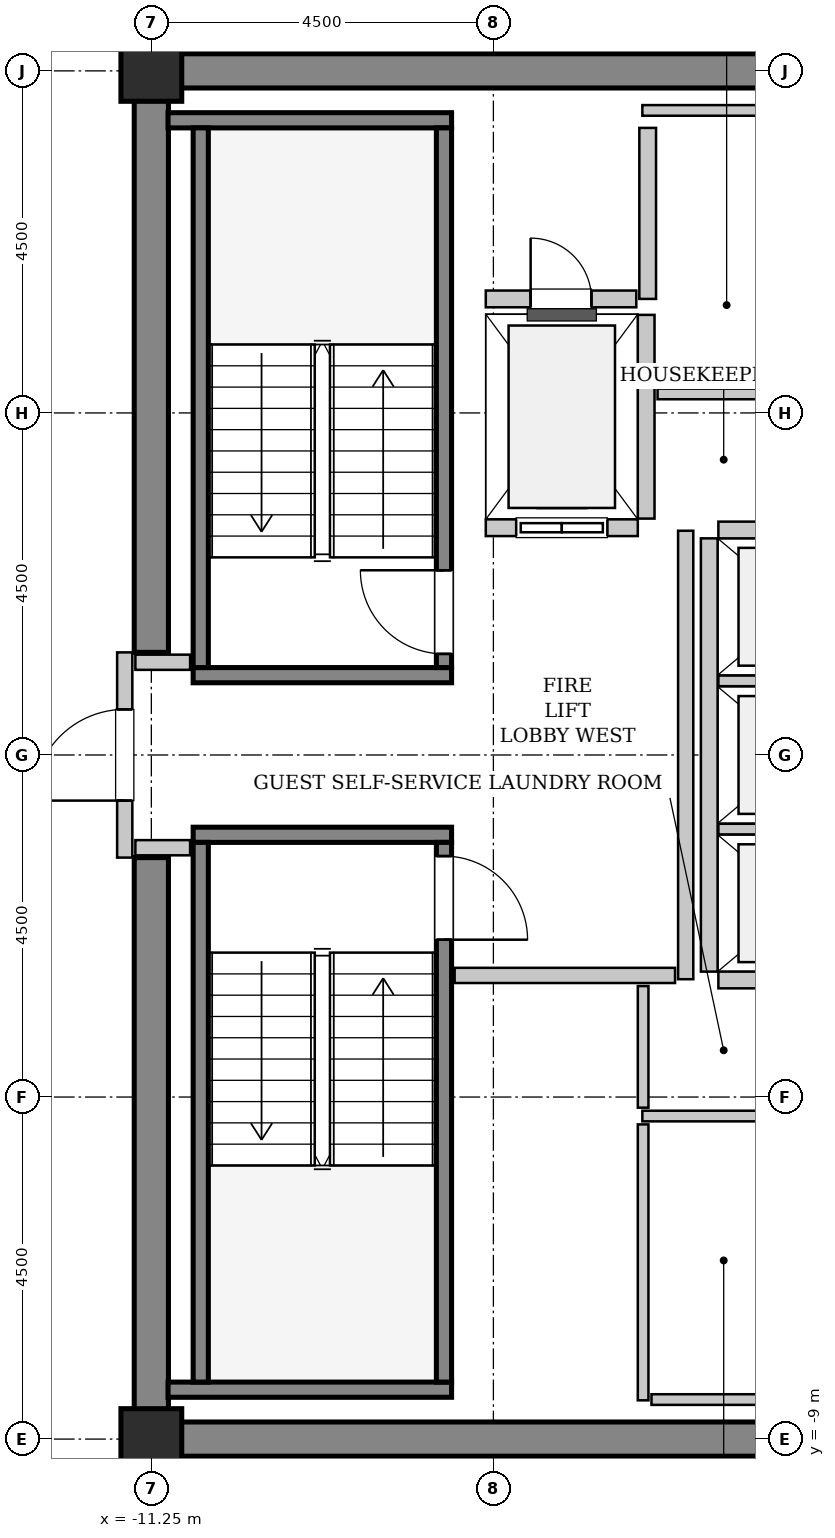
"""IFC4 building model, lengths in metres.
Left out: names, types, materials, properties, quantities, classifications, styles, units other than length and angle.
Written with IfcOpenShell. Run it as: python <this file> out.ifc"""

import sys

from ifc_helpers import new_model, si_unit, direction, frame, frame_2d, origin, origin_2d, place, context, subcontext, project, spatial, rectangle, hollow_rectangle, extrude, source, transform, mapped, element, fill, save


model = new_model("IFC4")
c1 = context("Model", 3, precision=1e-05, world=origin(), true_north=direction((0.0, 1.0)))
c2 = subcontext(c1, "Body", "Model", "MODEL_VIEW")
j1 = project(units=[si_unit("LENGTHUNIT", "METRE"), si_unit("PLANEANGLEUNIT", "RADIAN")], contexts=[c1])
p1 = place(None, origin())
s1 = spatial("IfcSite", under=j1, at=p1, CompositionType="ELEMENT")
p2 = place(p1, origin())
s2 = spatial("IfcBuilding", under=s1, at=p2, CompositionType="ELEMENT")
p3 = place(p2, frame((0.0, 0.0, 279.8)))
s3 = spatial("IfcBuildingStorey", under=s2, at=p3, CompositionType="ELEMENT", Elevation=279.8)
m1 = source(origin(), c2, "Body", "SweptSolid", [
    extrude(rectangle(XDim=9.925, YDim=0.45, at=frame_2d((4.962, 0.0))), origin(), (0.0, 0.0, 1.0), 3.8),
])
for number, where, z_axis, x_axis in (
    (1, (-11.475, 9.0, 0.0), (0.0, 0.0, 1.0), (1.0, 0.0, 0.0)),
    (2, (-11.475, -9.0, 0.0), (0.0, 0.0, 1.0), (1.0, 0.0, 0.0)),
):
    element("IfcWall", number, at=place(p3, frame(where, z_axis=z_axis, x_axis=x_axis)), inside=s3, PredefinedType="SHEAR", context=c2, shape_type="MappedRepresentation", body=[
        mapped(m1, transform((0.0, 0.0, 0.0), x_axis=(1.0, 0.0, 0.0), y_axis=(0.0, 1.0, 0.0), z_axis=(0.0, 0.0, 1.0), scale=1.0)),
    ])
m2 = source(origin(), c2, "Body", "SweptSolid", [
    extrude(rectangle(XDim=7.425, YDim=0.45, at=frame_2d((3.712, 0.0))), origin(), (0.0, 0.0, 1.0), 3.8),
])
for number, where, z_axis, x_axis in (
    (3, (-11.25, -8.775, 0.0), (0.0, 0.0, 1.0), (0.0, 1.0, 0.0)),
    (4, (-11.25, 1.35, 0.0), (0.0, 0.0, 1.0), (0.0, 1.0, 0.0)),
):
    element("IfcWall", number, at=place(p3, frame(where, z_axis=z_axis, x_axis=x_axis)), inside=s3, PredefinedType="SHEAR", context=c2, shape_type="MappedRepresentation", body=[
        mapped(m2, transform((0.0, 0.0, 0.0), x_axis=(1.0, 0.0, 0.0), y_axis=(0.0, 1.0, 0.0), z_axis=(0.0, 0.0, 1.0), scale=1.0)),
    ])
m3 = source(origin(), c2, "Body", "SweptSolid", [
    extrude(hollow_rectangle(XDim=0.8, YDim=0.8, WallThickness=0.04, InnerFilletRadius=0.04, OuterFilletRadius=0.08, at=origin_2d()), origin(), (0.0, 0.0, 1.0), 3.8),
])
for number, where, z_axis, x_axis in (
    (5, (-11.25, -9.0, 0.0), (0.0, 0.0, 1.0), (1.0, 0.0, 0.0)),
    (6, (-11.25, 9.0, 0.0), (0.0, 0.0, 1.0), (1.0, 0.0, 0.0)),
):
    element("IfcColumn", number, at=place(p3, frame(where, z_axis=z_axis, x_axis=x_axis)), inside=s3, PredefinedType="COLUMN", context=c2, shape_type="MappedRepresentation", body=[
        mapped(m3, transform((0.0, 0.0, 0.0), x_axis=(1.0, 0.0, 0.0), y_axis=(0.0, 1.0, 0.0), z_axis=(0.0, 0.0, 1.0), scale=1.0)),
    ])
m4 = source(origin(), c2, "Body", "SweptSolid", [
    extrude(rectangle(XDim=3.4, YDim=0.2, at=frame_2d((1.7, 0.0))), origin(), (0.0, 0.0, 1.0), 3.8),
])
p4 = place(p3, frame((-7.3, 1.05, 0.0), z_axis=(0.0, 0.0, 1.0), x_axis=(-1.0, 0.0, 0.0)))
e7 = element("IfcWall", 7, at=p4, inside=s3, PredefinedType="SOLIDWALL", context=c2, shape_type="MappedRepresentation", body=[
    mapped(m4, transform((0.0, 0.0, 0.0), x_axis=(1.0, 0.0, 0.0), y_axis=(0.0, 1.0, 0.0), z_axis=(0.0, 0.0, 1.0), scale=1.0)),
])
m5 = source(origin(), c2, "Body", "SweptSolid", [
    extrude(rectangle(XDim=3.73, YDim=0.2, at=frame_2d((1.865, 0.0))), origin(), (0.0, 0.0, 1.0), 3.8),
])
p5 = place(p3, frame((-7.3, 8.35, 0.0), z_axis=(0.0, 0.0, 1.0), x_axis=(-1.0, 0.0, 0.0)))
e8 = element("IfcWall", 8, at=p5, inside=s3, PredefinedType="SOLIDWALL", context=c2, shape_type="MappedRepresentation", body=[
    mapped(m5, transform((0.0, 0.0, 0.0), x_axis=(1.0, 0.0, 0.0), y_axis=(0.0, 1.0, 0.0), z_axis=(0.0, 0.0, 1.0), scale=1.0)),
])
m6 = source(origin(), c2, "Body", "SweptSolid", [
    extrude(rectangle(XDim=7.1, YDim=0.2, at=frame_2d((3.55, 0.0))), origin(), (0.0, 0.0, 1.0), 3.8),
])
p6 = place(p3, frame((-7.4, 1.15, 0.0), z_axis=(0.0, 0.0, 1.0), x_axis=(0.0, 1.0, 0.0)))
e9 = element("IfcWall", 9, at=p6, inside=s3, PredefinedType="SOLIDWALL", context=c2, shape_type="MappedRepresentation", body=[
    mapped(m6, transform((0.0, 0.0, 0.0), x_axis=(1.0, 0.0, 0.0), y_axis=(0.0, 1.0, 0.0), z_axis=(0.0, 0.0, 1.0), scale=1.0)),
])
p7 = place(p6, frame((0.18, 0.0, 0.0)))
e10 = element("IfcOpeningElement", 10, at=p7, cuts=e9, PredefinedType="OPENING", context=c2, shape_type="SweptSolid", body=[
    extrude(rectangle(XDim=1.1, YDim=2.15, at=frame_2d((0.55, 1.075))), frame((0.0, 0.11, 0.0), z_axis=(0.0, -1.0, 0.0), x_axis=(1.0, 0.0, 0.0)), (0.0, 0.0, 1.0), 0.22),
])
p8 = place(p3, frame((-10.6, 1.15, 0.0), z_axis=(0.0, 0.0, 1.0), x_axis=(0.0, 1.0, 0.0)))
e11 = element("IfcWall", 11, at=p8, inside=s3, PredefinedType="SOLIDWALL", context=c2, shape_type="MappedRepresentation", body=[
    mapped(m6, transform((0.0, 0.0, 0.0), x_axis=(1.0, 0.0, 0.0), y_axis=(0.0, 1.0, 0.0), z_axis=(0.0, 0.0, 1.0), scale=1.0)),
])
p9 = place(p3, frame((-10.7, -1.05, 0.0), z_axis=(0.0, 0.0, 1.0), x_axis=(1.0, 0.0, 0.0)))
e12 = element("IfcWall", 12, at=p9, inside=s3, PredefinedType="SOLIDWALL", context=c2, shape_type="MappedRepresentation", body=[
    mapped(m4, transform((0.0, 0.0, 0.0), x_axis=(1.0, 0.0, 0.0), y_axis=(0.0, 1.0, 0.0), z_axis=(0.0, 0.0, 1.0), scale=1.0)),
])
p10 = place(p3, frame((-11.03, -8.35, 0.0), z_axis=(0.0, 0.0, 1.0), x_axis=(1.0, 0.0, 0.0)))
e13 = element("IfcWall", 13, at=p10, inside=s3, PredefinedType="SOLIDWALL", context=c2, shape_type="MappedRepresentation", body=[
    mapped(m5, transform((0.0, 0.0, 0.0), x_axis=(1.0, 0.0, 0.0), y_axis=(0.0, 1.0, 0.0), z_axis=(0.0, 0.0, 1.0), scale=1.0)),
])
p11 = place(p3, frame((-10.6, -1.15, 0.0), z_axis=(0.0, 0.0, 1.0), x_axis=(0.0, -1.0, 0.0)))
e14 = element("IfcWall", 14, at=p11, inside=s3, PredefinedType="SOLIDWALL", context=c2, shape_type="MappedRepresentation", body=[
    mapped(m6, transform((0.0, 0.0, 0.0), x_axis=(1.0, 0.0, 0.0), y_axis=(0.0, 1.0, 0.0), z_axis=(0.0, 0.0, 1.0), scale=1.0)),
])
p12 = place(p3, frame((-7.4, -1.15, 0.0), z_axis=(0.0, 0.0, 1.0), x_axis=(0.0, -1.0, 0.0)))
e15 = element("IfcWall", 15, at=p12, inside=s3, PredefinedType="SOLIDWALL", context=c2, shape_type="MappedRepresentation", body=[
    mapped(m6, transform((0.0, 0.0, 0.0), x_axis=(1.0, 0.0, 0.0), y_axis=(0.0, 1.0, 0.0), z_axis=(0.0, 0.0, 1.0), scale=1.0)),
])
p13 = place(p12, frame((0.18, 0.0, 0.0)))
e16 = element("IfcOpeningElement", 16, at=p13, cuts=e15, PredefinedType="OPENING", context=c2, shape_type="SweptSolid", body=[
    extrude(rectangle(XDim=1.1, YDim=2.15, at=frame_2d((0.55, 1.075))), frame((0.0, 0.11, 0.0), z_axis=(0.0, -1.0, 0.0), x_axis=(1.0, 0.0, 0.0)), (0.0, 0.0, 1.0), 0.22),
])
m7 = source(origin(), c2, "Body", "SweptSolid", [
    extrude(rectangle(XDim=2.0, YDim=0.22, at=frame_2d((1.0, 0.0))), origin(), (0.0, 0.0, 1.0), 3.535),
])
p14 = place(p3, frame((-6.85, 2.99, 0.0), z_axis=(0.0, 0.0, 1.0), x_axis=(1.0, 0.0, 0.0)))
e17 = element("IfcWall", 17, at=p14, inside=s3, PredefinedType="SOLIDWALL", context=c2, shape_type="MappedRepresentation", body=[
    mapped(m7, transform((0.0, 0.0, 0.0), x_axis=(1.0, 0.0, 0.0), y_axis=(0.0, 1.0, 0.0), z_axis=(0.0, 0.0, 1.0), scale=1.0)),
])
p15 = place(p14, frame((0.4, 0.0, 0.0)))
e18 = element("IfcOpeningElement", 18, at=p15, cuts=e17, PredefinedType="OPENING", context=c2, shape_type="SweptSolid", body=[
    extrude(rectangle(XDim=1.2, YDim=2.2, at=frame_2d((0.6, 1.1))), frame((0.0, 0.12, 0.0), z_axis=(0.0, -1.0, 0.0), x_axis=(1.0, 0.0, 0.0)), (0.0, 0.0, 1.0), 0.24),
])
m8 = source(origin(), c2, "Body", "SweptSolid", [
    extrude(rectangle(XDim=2.68, YDim=0.22, at=frame_2d((1.34, 0.0))), origin(), (0.0, 0.0, 1.0), 3.535),
])
p16 = place(p3, frame((-4.74, 3.11, 0.0), z_axis=(0.0, 0.0, 1.0), x_axis=(0.0, 1.0, 0.0)))
e19 = element("IfcWall", 19, at=p16, inside=s3, PredefinedType="SOLIDWALL", context=c2, shape_type="MappedRepresentation", body=[
    mapped(m8, transform((0.0, 0.0, 0.0), x_axis=(1.0, 0.0, 0.0), y_axis=(0.0, 1.0, 0.0), z_axis=(0.0, 0.0, 1.0), scale=1.0)),
])
m9 = source(origin(), c2, "Body", "SweptSolid", [
    extrude(rectangle(XDim=5.7, YDim=0.22, at=frame_2d((2.85, 0.0))), origin(), (0.0, 0.0, 1.0), 3.535),
])
p17 = place(p3, frame((-3.91, 2.85, 0.0), z_axis=(0.0, 0.0, 1.0), x_axis=(0.0, -1.0, 0.0)))
e20 = element("IfcWall", 20, at=p17, inside=s3, PredefinedType="SOLIDWALL", context=c2, shape_type="MappedRepresentation", body=[
    mapped(m9, transform((0.0, 0.0, 0.0), x_axis=(1.0, 0.0, 0.0), y_axis=(0.0, 1.0, 0.0), z_axis=(0.0, 0.0, 1.0), scale=1.0)),
])
m10 = source(origin(), c2, "Body", "SweptSolid", [
    extrude(rectangle(XDim=2.13, YDim=0.22, at=frame_2d((1.065, 0.0))), origin(), (0.0, 0.0, 1.0), 3.535),
])
p18 = place(p3, frame((-3.79, -2.96, 0.0), z_axis=(0.0, 0.0, 1.0), x_axis=(1.0, 0.0, 0.0)))
e21 = element("IfcWall", 21, at=p18, inside=s3, PredefinedType="SOLIDWALL", context=c2, shape_type="MappedRepresentation", body=[
    mapped(m10, transform((0.0, 0.0, 0.0), x_axis=(1.0, 0.0, 0.0), y_axis=(0.0, 1.0, 0.0), z_axis=(0.0, 0.0, 1.0), scale=1.0)),
])
m11 = source(origin(), c2, "Body", "SweptSolid", [
    extrude(rectangle(XDim=2.13, YDim=0.14, at=frame_2d((1.065, 0.0))), origin(), (0.0, 0.0, 1.0), 3.535),
])
for number, where, z_axis, x_axis in (
    (22, (-3.79, -0.975, 0.0), (0.0, 0.0, 1.0), (1.0, 0.0, 0.0)),
    (23, (-3.79, 0.975, 0.0), (0.0, 0.0, 1.0), (1.0, 0.0, 0.0)),
):
    element("IfcWall", number, at=place(p3, frame(where, z_axis=z_axis, x_axis=x_axis)), inside=s3, PredefinedType="PARTITIONING", context=c2, shape_type="MappedRepresentation", body=[
        mapped(m11, transform((0.0, 0.0, 0.0), x_axis=(1.0, 0.0, 0.0), y_axis=(0.0, 1.0, 0.0), z_axis=(0.0, 0.0, 1.0), scale=1.0)),
    ])
p19 = place(p3, frame((-1.66, 2.96, 0.0), z_axis=(0.0, 0.0, 1.0), x_axis=(-1.0, 0.0, 0.0)))
e24 = element("IfcWall", 24, at=p19, inside=s3, PredefinedType="SOLIDWALL", context=c2, shape_type="MappedRepresentation", body=[
    mapped(m10, transform((0.0, 0.0, 0.0), x_axis=(1.0, 0.0, 0.0), y_axis=(0.0, 1.0, 0.0), z_axis=(0.0, 0.0, 1.0), scale=1.0)),
])
m12 = source(origin(), c2, "Body", "SweptSolid", [
    extrude(rectangle(XDim=2.25, YDim=0.22, at=frame_2d((1.125, 0.0))), origin(), (0.0, 0.0, 1.0), 3.535),
])
p20 = place(p3, frame((-4.72, 6.0, 0.0), z_axis=(0.0, 0.0, 1.0), x_axis=(0.0, 1.0, 0.0)))
e25 = element("IfcWall", 25, at=p20, inside=s3, PredefinedType="SOLIDWALL", context=c2, shape_type="MappedRepresentation", body=[
    mapped(m12, transform((0.0, 0.0, 0.0), x_axis=(1.0, 0.0, 0.0), y_axis=(0.0, 1.0, 0.0), z_axis=(0.0, 0.0, 1.0), scale=1.0)),
])
m13 = source(origin(), c2, "Body", "SweptSolid", [
    extrude(rectangle(XDim=1.98, YDim=0.22, at=frame_2d((0.99, 0.0))), origin(), (0.0, 0.0, 1.0), 3.535),
])
p21 = place(p3, frame((-6.85, 6.0, 0.0), z_axis=(0.0, 0.0, 1.0), x_axis=(1.0, 0.0, 0.0)))
e26 = element("IfcWall", 26, at=p21, inside=s3, PredefinedType="SOLIDWALL", context=c2, shape_type="MappedRepresentation", body=[
    mapped(m13, transform((0.0, 0.0, 0.0), x_axis=(1.0, 0.0, 0.0), y_axis=(0.0, 1.0, 0.0), z_axis=(0.0, 0.0, 1.0), scale=1.0)),
])
p22 = place(p21, frame((0.59, 0.0, 0.0)))
e27 = element("IfcOpeningElement", 27, at=p22, cuts=e26, PredefinedType="OPENING", context=c2, shape_type="SweptSolid", body=[
    extrude(rectangle(XDim=0.8, YDim=2.0, at=frame_2d((0.4, 1.0))), frame((0.0, 0.12, 0.0), z_axis=(0.0, -1.0, 0.0), x_axis=(1.0, 0.0, 0.0)), (0.0, 0.0, 1.0), 0.24),
])
m14 = source(origin(), c2, "Body", "SweptSolid", [
    extrude(rectangle(XDim=2.7, YDim=0.2, at=frame_2d((1.35, 0.0))), origin(), (0.0, 0.0, 1.0), 2.625),
])
p23 = place(p3, frame((-11.6, -1.35, 0.0), z_axis=(0.0, 0.0, 1.0), x_axis=(0.0, 1.0, 0.0)))
e28 = element("IfcWall", 28, at=p23, inside=s3, PredefinedType="PARTITIONING", context=c2, shape_type="MappedRepresentation", body=[
    mapped(m14, transform((0.0, 0.0, 0.0), x_axis=(1.0, 0.0, 0.0), y_axis=(0.0, 1.0, 0.0), z_axis=(0.0, 0.0, 1.0), scale=1.0)),
])
p24 = place(p23, frame((0.75, 0.0, 0.0)))
e29 = element("IfcOpeningElement", 29, at=p24, cuts=e28, PredefinedType="OPENING", context=c2, shape_type="SweptSolid", body=[
    extrude(rectangle(XDim=1.2, YDim=2.15, at=frame_2d((0.6, 1.075))), frame((0.0, 0.11, 0.0), z_axis=(0.0, -1.0, 0.0), x_axis=(1.0, 0.0, 0.0)), (0.0, 0.0, 1.0), 0.22),
])
m15 = source(origin(), c2, "Body", "SweptSolid", [
    extrude(rectangle(XDim=5.9, YDim=0.2, at=frame_2d((2.95, 0.0))), origin(), (0.0, 0.0, 1.0), 3.535),
])
p25 = place(p3, frame((-4.22, -2.95, 0.0), z_axis=(0.0, 0.0, 1.0), x_axis=(0.0, 1.0, 0.0)))
e30 = element("IfcWall", 30, at=p25, inside=s3, PredefinedType="PARTITIONING", context=c2, shape_type="MappedRepresentation", body=[
    mapped(m15, transform((0.0, 0.0, 0.0), x_axis=(1.0, 0.0, 0.0), y_axis=(0.0, 1.0, 0.0), z_axis=(0.0, 0.0, 1.0), scale=1.0)),
])
m16 = source(origin(), c2, "Body", "SweptSolid", [
    extrude(rectangle(XDim=2.9, YDim=0.2, at=frame_2d((1.45, 0.0))), origin(), (0.0, 0.0, 1.0), 3.535),
])
p26 = place(p3, frame((-7.26, -2.9, 0.0), z_axis=(0.0, 0.0, 1.0), x_axis=(1.0, 0.0, 0.0)))
e31 = element("IfcWall", 31, at=p26, inside=s3, PredefinedType="PARTITIONING", context=c2, shape_type="MappedRepresentation", body=[
    mapped(m16, transform((0.0, 0.0, 0.0), x_axis=(1.0, 0.0, 0.0), y_axis=(0.0, 1.0, 0.0), z_axis=(0.0, 0.0, 1.0), scale=1.0)),
])
m17 = source(origin(), c2, "Body", "SweptSolid", [
    extrude(rectangle(XDim=0.72, YDim=0.2, at=frame_2d((0.36, 0.0))), origin(), (0.0, 0.0, 1.0), 3.535),
])
for number, where, z_axis, x_axis in (
    (32, (-11.46, 1.22, 0.0), (0.0, 0.0, 1.0), (1.0, 0.0, 0.0)),
    (33, (-11.46, -1.22, 0.0), (0.0, 0.0, 1.0), (1.0, 0.0, 0.0)),
):
    element("IfcWall", number, at=place(p3, frame(where, z_axis=z_axis, x_axis=x_axis)), inside=s3, PredefinedType="PARTITIONING", context=c2, shape_type="MappedRepresentation", body=[
        mapped(m17, transform((0.0, 0.0, 0.0), x_axis=(1.0, 0.0, 0.0), y_axis=(0.0, 1.0, 0.0), z_axis=(0.0, 0.0, 1.0), scale=1.0)),
    ])
m18 = source(origin(), c2, "Body", "SweptSolid", [
    extrude(rectangle(XDim=2.95, YDim=0.14, at=frame_2d((1.475, 0.0))), origin(), (0.0, 0.0, 1.0), 3.535),
])
p27 = place(p3, frame((-4.59, 4.75, 0.0), z_axis=(0.0, 0.0, 1.0), x_axis=(1.0, 0.0, 0.0)))
e34 = element("IfcWall", 34, at=p27, inside=s3, PredefinedType="PARTITIONING", context=c2, shape_type="MappedRepresentation", body=[
    mapped(m18, transform((0.0, 0.0, 0.0), x_axis=(1.0, 0.0, 0.0), y_axis=(0.0, 1.0, 0.0), z_axis=(0.0, 0.0, 1.0), scale=1.0)),
])
m19 = source(origin(), c2, "Body", "SweptSolid", [
    extrude(rectangle(XDim=3.15, YDim=0.14, at=frame_2d((1.575, 0.0))), origin(), (0.0, 0.0, 1.0), 3.535),
])
for number, where, z_axis, x_axis in (
    (35, (-4.79, 8.48, 0.0), (0.0, 0.0, 1.0), (1.0, 0.0, 0.0)),
    (36, (-4.79, -4.75, 0.0), (0.0, 0.0, 1.0), (1.0, 0.0, 0.0)),
):
    element("IfcWall", number, at=place(p3, frame(where, z_axis=z_axis, x_axis=x_axis)), inside=s3, PredefinedType="PARTITIONING", context=c2, shape_type="MappedRepresentation", body=[
        mapped(m19, transform((0.0, 0.0, 0.0), x_axis=(1.0, 0.0, 0.0), y_axis=(0.0, 1.0, 0.0), z_axis=(0.0, 0.0, 1.0), scale=1.0)),
    ])
m20 = source(origin(), c2, "Body", "SweptSolid", [
    extrude(rectangle(XDim=1.6, YDim=0.14, at=frame_2d((0.8, 0.0))), origin(), (0.0, 0.0, 1.0), 3.535),
])
p28 = place(p3, frame((-4.78, -4.64, 0.0), z_axis=(0.0, 0.0, 1.0), x_axis=(0.0, 1.0, 0.0)))
e37 = element("IfcWall", 37, at=p28, inside=s3, PredefinedType="PARTITIONING", context=c2, shape_type="MappedRepresentation", body=[
    mapped(m20, transform((0.0, 0.0, 0.0), x_axis=(1.0, 0.0, 0.0), y_axis=(0.0, 1.0, 0.0), z_axis=(0.0, 0.0, 1.0), scale=1.0)),
])
m21 = source(origin(), c2, "Body", "SweptSolid", [
    extrude(rectangle(XDim=3.63, YDim=0.14, at=frame_2d((1.815, 0.0))), origin(), (0.0, 0.0, 1.0), 3.535),
])
p29 = place(p3, frame((-4.78, -8.49, 0.0), z_axis=(0.0, 0.0, 1.0), x_axis=(0.0, 1.0, 0.0)))
e38 = element("IfcWall", 38, at=p29, inside=s3, PredefinedType="PARTITIONING", context=c2, shape_type="MappedRepresentation", body=[
    mapped(m21, transform((0.0, 0.0, 0.0), x_axis=(1.0, 0.0, 0.0), y_axis=(0.0, 1.0, 0.0), z_axis=(0.0, 0.0, 1.0), scale=1.0)),
])
m22 = source(origin(), c2, "Body", "SweptSolid", [
    extrude(rectangle(XDim=3.03, YDim=0.14, at=frame_2d((1.515, 0.0))), origin(), (0.0, 0.0, 1.0), 3.535),
])
p30 = place(p3, frame((-4.67, -8.48, 0.0), z_axis=(0.0, 0.0, 1.0), x_axis=(1.0, 0.0, 0.0)))
e39 = element("IfcWall", 39, at=p30, inside=s3, PredefinedType="PARTITIONING", context=c2, shape_type="MappedRepresentation", body=[
    mapped(m22, transform((0.0, 0.0, 0.0), x_axis=(1.0, 0.0, 0.0), y_axis=(0.0, 1.0, 0.0), z_axis=(0.0, 0.0, 1.0), scale=1.0)),
])
m23 = source(origin(), c2, "Body", "SweptSolid", [
    extrude(rectangle(XDim=1.1, YDim=2.15, at=frame_2d((0.55, 1.075))), frame((0.0, 0.025, 0.0), z_axis=(0.0, -1.0, 0.0), x_axis=(1.0, 0.0, 0.0)), (0.0, 0.0, 1.0), 0.05),
])
p31 = place(p7, origin())
e40 = element("IfcDoor", 40, at=p31, inside=s3, OperationType="SINGLE_SWING_RIGHT", PredefinedType="DOOR", context=c2, shape_type="MappedRepresentation", body=[
    mapped(m23, transform((0.0, 0.0, 0.0), x_axis=(1.0, 0.0, 0.0), y_axis=(0.0, 1.0, 0.0), z_axis=(0.0, 0.0, 1.0), scale=1.0)),
])
fill(e10, e40)
p32 = place(p13, origin())
e41 = element("IfcDoor", 41, at=p32, inside=s3, OperationType="SINGLE_SWING_RIGHT", PredefinedType="DOOR", context=c2, shape_type="MappedRepresentation", body=[
    mapped(m23, transform((0.0, 0.0, 0.0), x_axis=(1.0, 0.0, 0.0), y_axis=(0.0, 1.0, 0.0), z_axis=(0.0, 0.0, 1.0), scale=1.0)),
])
fill(e16, e41)
m24 = source(origin(), c2, "Body", "SweptSolid", [
    extrude(rectangle(XDim=1.2, YDim=2.2, at=frame_2d((0.6, 1.1))), frame((0.0, 0.025, 0.0), z_axis=(0.0, -1.0, 0.0), x_axis=(1.0, 0.0, 0.0)), (0.0, 0.0, 1.0), 0.05),
])
p33 = place(p15, origin())
e42 = element("IfcDoor", 42, at=p33, inside=s3, OperationType="SLIDING_TO_LEFT", PredefinedType="DOOR", context=c2, shape_type="MappedRepresentation", body=[
    mapped(m24, transform((0.0, 0.0, 0.0), x_axis=(1.0, 0.0, 0.0), y_axis=(0.0, 1.0, 0.0), z_axis=(0.0, 0.0, 1.0), scale=1.0)),
])
fill(e18, e42)
m25 = source(origin(), c2, "Body", "SweptSolid", [
    extrude(rectangle(XDim=0.8, YDim=2.0, at=frame_2d((0.4, 1.0))), frame((0.0, 0.025, 0.0), z_axis=(0.0, -1.0, 0.0), x_axis=(1.0, 0.0, 0.0)), (0.0, 0.0, 1.0), 0.05),
])
p34 = place(p22, origin())
e43 = element("IfcDoor", 43, at=p34, inside=s3, OperationType="SINGLE_SWING_LEFT", PredefinedType="TRAPDOOR", context=c2, shape_type="MappedRepresentation", body=[
    mapped(m25, transform((0.0, 0.0, 0.0), x_axis=(1.0, 0.0, 0.0), y_axis=(0.0, 1.0, 0.0), z_axis=(0.0, 0.0, 1.0), scale=1.0)),
])
fill(e27, e43)
m26 = source(origin(), c2, "Body", "SweptSolid", [
    extrude(rectangle(XDim=1.2, YDim=2.15, at=frame_2d((0.6, 1.075))), frame((0.0, 0.025, 0.0), z_axis=(0.0, -1.0, 0.0), x_axis=(1.0, 0.0, 0.0)), (0.0, 0.0, 1.0), 0.05),
])
p35 = place(p24, origin())
e44 = element("IfcDoor", 44, at=p35, inside=s3, OperationType="SINGLE_SWING_LEFT", PredefinedType="DOOR", context=c2, shape_type="MappedRepresentation", body=[
    mapped(m26, transform((0.0, 0.0, 0.0), x_axis=(1.0, 0.0, 0.0), y_axis=(0.0, 1.0, 0.0), z_axis=(0.0, 0.0, 1.0), scale=1.0)),
])
fill(e29, e44)
save(model, sys.argv[1])
